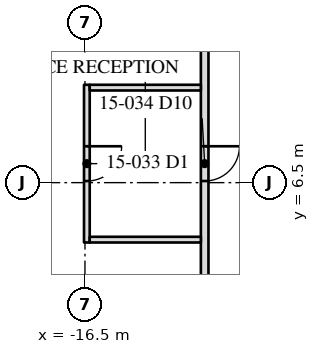
"""IFC4 building model, lengths in metres.
Left out: names, types, materials, properties, quantities, classifications, styles, units other than length and angle.
Written with IfcOpenShell. Run it as: python <this file> out.ifc"""

import sys

from ifc_helpers import new_model, si_unit, direction, frame, frame_2d, origin, place, context, subcontext, project, spatial, rectangle, extrude, element, fill, save


model = new_model("IFC4")
c1 = context("Model", 3, precision=1e-05, world=origin(), true_north=direction((0.0, 1.0)))
c2 = subcontext(c1, "Body", "Model", "MODEL_VIEW")
j1 = project(units=[si_unit("LENGTHUNIT", "METRE"), si_unit("PLANEANGLEUNIT", "RADIAN")], contexts=[c1])
p1 = place(None, origin())
s1 = spatial("IfcSite", under=j1, at=p1, CompositionType="ELEMENT")
p2 = place(p1, origin())
s2 = spatial("IfcBuilding", under=s1, at=p2, CompositionType="ELEMENT")
p3 = place(p2, frame((0.0, 0.0, 65.2)))
s3 = spatial("IfcBuildingStorey", under=s2, at=p3, CompositionType="ELEMENT", Elevation=65.2)
p4 = place(p3, frame((-13.35, 13.45, 0.0), z_axis=(0.0, 0.0, 1.0), x_axis=(0.0, -1.0, 0.0)))
e1 = element("IfcWall", 1, at=p4, inside=s3, PredefinedType="PARTITIONING", context=c2, shape_type="SweptSolid", body=[
    extrude(rectangle(XDim=26.7, YDim=0.2, at=frame_2d((13.35, 0.0))), origin(), (0.0, 0.0, 1.0), 3.91),
])
p5 = place(p4, frame((5.992, 0.0, 0.0)))
e2 = element("IfcOpeningElement", 2, at=p5, cuts=e1, PredefinedType="OPENING", context=c2, shape_type="SweptSolid", body=[
    extrude(rectangle(XDim=0.915, YDim=2.134, at=frame_2d((0.458, 1.067))), frame((0.0, 0.11, 0.0), z_axis=(0.0, -1.0, 0.0), x_axis=(1.0, 0.0, 0.0)), (0.0, 0.0, 1.0), 0.22),
])
p6 = place(p3, frame((-16.45, 9.075, 0.0), z_axis=(0.0, 0.0, 1.0), x_axis=(0.0, -1.0, 0.0)))
e3 = element("IfcWall", 3, at=p6, inside=s3, PredefinedType="PARTITIONING", context=c2, shape_type="SweptSolid", body=[
    extrude(rectangle(XDim=4.15, YDim=0.15, at=frame_2d((2.075, 0.0))), origin(), (0.0, 0.0, 1.0), 3.91),
])
p7 = place(p6, frame((1.617, 0.0, 0.0)))
e4 = element("IfcOpeningElement", 4, at=p7, cuts=e3, PredefinedType="OPENING", context=c2, shape_type="SweptSolid", body=[
    extrude(rectangle(XDim=0.915, YDim=2.134, at=frame_2d((0.458, 1.067))), frame((0.0, 0.085, 0.0), z_axis=(0.0, -1.0, 0.0), x_axis=(1.0, 0.0, 0.0)), (0.0, 0.0, 1.0), 0.17),
])
for number, where, z_axis, x_axis in (
    (5, (-16.375, 9.0, 0.0), (0.0, 0.0, 1.0), (1.0, 0.0, 0.0)),
    (6, (-16.375, 5.0, 0.0), (0.0, 0.0, 1.0), (1.0, 0.0, 0.0)),
):
    element("IfcWall", number, at=place(p3, frame(where, z_axis=z_axis, x_axis=x_axis)), inside=s3, PredefinedType="PARTITIONING", context=c2, shape_type="SweptSolid", body=[
        extrude(rectangle(XDim=2.925, YDim=0.15, at=frame_2d((1.462, 0.0))), origin(), (0.0, 0.0, 1.0), 3.91),
    ])
p8 = place(p7, origin())
e7 = element("IfcDoor", 7, at=p8, inside=s3, OperationType="SINGLE_SWING_LEFT", PredefinedType="DOOR", context=c2, shape_type="SweptSolid", body=[
    extrude(rectangle(XDim=0.915, YDim=2.134, at=frame_2d((0.458, 1.067))), frame((0.0, 0.025, 0.0), z_axis=(0.0, -1.0, 0.0), x_axis=(1.0, 0.0, 0.0)), (0.0, 0.0, 1.0), 0.05),
])
fill(e4, e7)
p9 = place(p5, origin())
e8 = element("IfcDoor", 8, at=p9, inside=s3, OperationType="SINGLE_SWING_LEFT", PredefinedType="DOOR", context=c2, shape_type="SweptSolid", body=[
    extrude(rectangle(XDim=0.915, YDim=2.134, at=frame_2d((0.458, 1.067))), frame((0.0, 0.025, 0.0), z_axis=(0.0, -1.0, 0.0), x_axis=(1.0, 0.0, 0.0)), (0.0, 0.0, 1.0), 0.05),
])
fill(e2, e8)
save(model, sys.argv[1])
